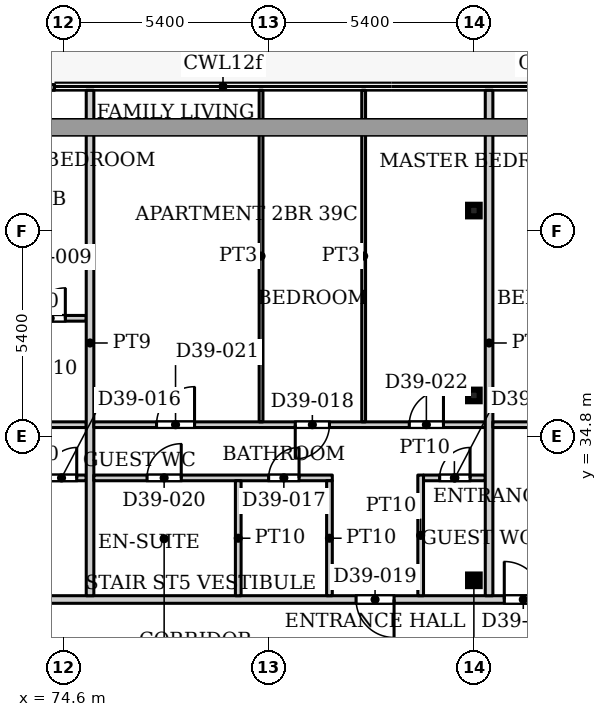
"""IFC4 building model, lengths in metres.
Left out: names, types, materials, properties, quantities, classifications, styles, units other than length and angle.
Written with IfcOpenShell. Run it as: python <this file> out.ifc"""

import sys

from ifc_helpers import new_model, si_unit, direction, frame, frame_2d, origin, origin_2d, place, context, subcontext, project, spatial, rectangle, hollow_rectangle, extrude, source, transform, mapped, element, fill, save


model = new_model("IFC4")
c1 = context("Model", 3, precision=1e-05, world=origin(), true_north=direction((0.0, 1.0)))
c2 = subcontext(c1, "Body", "Model", "MODEL_VIEW")
j1 = project(units=[si_unit("LENGTHUNIT", "METRE"), si_unit("PLANEANGLEUNIT", "RADIAN")], contexts=[c1])
p1 = place(None, origin())
s1 = spatial("IfcSite", under=j1, at=p1, CompositionType="ELEMENT")
p2 = place(p1, origin())
s2 = spatial("IfcBuilding", under=s1, at=p2, CompositionType="ELEMENT")
p3 = place(p2, frame((0.0, 0.0, 168.2)))
s3 = spatial("IfcBuildingStorey", under=s2, at=p3, CompositionType="ELEMENT", Elevation=168.2)
for number, where, z_axis, x_axis in (
    (1, (85.4, 31.005, 0.0), (0.0, 0.0, 1.0), (1.0, 0.0, 0.0)),
    (2, (85.4, 35.87, 0.0), (0.0, 0.0, 1.0), (1.0, 0.0, 0.0)),
    (3, (85.4, 40.735, 0.0), (0.0, 0.0, 1.0), (1.0, 0.0, 0.0)),
):
    element("IfcColumn", number, at=place(p3, frame(where, z_axis=z_axis, x_axis=x_axis)), inside=s3, PredefinedType="COLUMN", context=c2, shape_type="SweptSolid", body=[
        extrude(hollow_rectangle(XDim=0.305, YDim=0.305, WallThickness=0.016, InnerFilletRadius=0.016, OuterFilletRadius=0.032, at=origin_2d()), origin(), (0.0, 0.0, 1.0), 3.9),
    ])
p4 = place(p3, frame((71.965, 43.975, 0.0), z_axis=(0.0, 0.0, 1.0), x_axis=(1.0, 0.0, 0.0)))
e4 = element("IfcWall", 4, at=p4, inside=s3, PredefinedType="SOLIDWALL", context=c2, shape_type="SweptSolid", body=[
    extrude(rectangle(XDim=2.4, YDim=0.15, at=frame_2d((1.2, 0.0))), origin(), (0.0, 0.0, 1.0), 3.75),
])
p5 = place(p4, frame((0.3, 0.0, 0.0)))
e5 = element("IfcOpeningElement", 5, at=p5, cuts=e4, PredefinedType="OPENING", context=c2, shape_type="SweptSolid", body=[
    extrude(rectangle(XDim=1.8, YDim=2.4, at=frame_2d((0.9, 1.2))), frame((0.0, 0.085, 0.0), z_axis=(0.0, -1.0, 0.0), x_axis=(1.0, 0.0, 0.0)), (0.0, 0.0, 1.0), 0.17),
])
p6 = place(p3, frame((53.549, 30.5, 0.0), z_axis=(0.0, 0.0, 1.0), x_axis=(1.0, 0.0, 0.0)))
e6 = element("IfcWall", 6, at=p6, inside=s3, PredefinedType="PARTITIONING", context=c2, shape_type="SweptSolid", body=[
    extrude(rectangle(XDim=39.151, YDim=0.2, at=frame_2d((19.575, 0.0))), origin(), (0.0, 0.0, 1.0), 3.6),
])
p7 = place(p6, frame((2.801, 0.0, 0.0)))
e7 = element("IfcOpeningElement", 7, at=p7, cuts=e6, PredefinedType="OPENING", context=c2, shape_type="SweptSolid", body=[
    extrude(rectangle(XDim=1.0, YDim=2.1, at=frame_2d((0.5, 1.05))), frame((0.0, 0.11, 0.0), z_axis=(0.0, -1.0, 0.0), x_axis=(1.0, 0.0, 0.0)), (0.0, 0.0, 1.0), 0.22),
])
p8 = place(p6, frame((9.851, 0.0, 0.0)))
e8 = element("IfcOpeningElement", 8, at=p8, cuts=e6, PredefinedType="OPENING", context=c2, shape_type="SweptSolid", body=[
    extrude(rectangle(XDim=1.0, YDim=2.1, at=frame_2d((0.5, 1.05))), frame((0.0, 0.11, 0.0), z_axis=(0.0, -1.0, 0.0), x_axis=(1.0, 0.0, 0.0)), (0.0, 0.0, 1.0), 0.22),
])
p9 = place(p6, frame((28.751, 0.0, 0.0)))
e9 = element("IfcOpeningElement", 9, at=p9, cuts=e6, PredefinedType="OPENING", context=c2, shape_type="SweptSolid", body=[
    extrude(rectangle(XDim=1.0, YDim=2.1, at=frame_2d((0.5, 1.05))), frame((0.0, 0.11, 0.0), z_axis=(0.0, -1.0, 0.0), x_axis=(1.0, 0.0, 0.0)), (0.0, 0.0, 1.0), 0.22),
])
p10 = place(p6, frame((32.651, 0.0, 0.0)))
e10 = element("IfcOpeningElement", 10, at=p10, cuts=e6, PredefinedType="OPENING", context=c2, shape_type="SweptSolid", body=[
    extrude(rectangle(XDim=1.0, YDim=2.1, at=frame_2d((0.5, 1.05))), frame((0.0, 0.11, 0.0), z_axis=(0.0, -1.0, 0.0), x_axis=(1.0, 0.0, 0.0)), (0.0, 0.0, 1.0), 0.22),
])
p11 = place(p3, frame((63.1, 35.1, 0.0), z_axis=(0.0, 0.0, 1.0), x_axis=(1.0, 0.0, 0.0)))
e11 = element("IfcWall", 11, at=p11, inside=s3, PredefinedType="PARTITIONING", context=c2, shape_type="SweptSolid", body=[
    extrude(rectangle(XDim=12.1, YDim=0.15, at=frame_2d((6.05, 0.0))), origin(), (0.0, 0.0, 1.0), 3.6),
])
p12 = place(p11, frame((1.1, 0.0, 0.0)))
e12 = element("IfcOpeningElement", 12, at=p12, cuts=e11, PredefinedType="OPENING", context=c2, shape_type="SweptSolid", body=[
    extrude(rectangle(XDim=0.9, YDim=2.1, at=frame_2d((0.45, 1.05))), frame((0.0, 0.085, 0.0), z_axis=(0.0, -1.0, 0.0), x_axis=(1.0, 0.0, 0.0)), (0.0, 0.0, 1.0), 0.17),
])
p13 = place(p11, frame((5.1, 0.0, 0.0)))
e13 = element("IfcOpeningElement", 13, at=p13, cuts=e11, PredefinedType="OPENING", context=c2, shape_type="SweptSolid", body=[
    extrude(rectangle(XDim=1.0, YDim=2.1, at=frame_2d((0.5, 1.05))), frame((0.0, 0.085, 0.0), z_axis=(0.0, -1.0, 0.0), x_axis=(1.0, 0.0, 0.0)), (0.0, 0.0, 1.0), 0.17),
])
p14 = place(p11, frame((8.6, 0.0, 0.0)))
e14 = element("IfcOpeningElement", 14, at=p14, cuts=e11, PredefinedType="OPENING", context=c2, shape_type="SweptSolid", body=[
    extrude(rectangle(XDim=0.9, YDim=2.1, at=frame_2d((0.45, 1.05))), frame((0.0, 0.085, 0.0), z_axis=(0.0, -1.0, 0.0), x_axis=(1.0, 0.0, 0.0)), (0.0, 0.0, 1.0), 0.17),
])
p15 = place(p3, frame((64.725, 33.7, 0.0), z_axis=(0.0, 0.0, 1.0), x_axis=(1.0, 0.0, 0.0)))
e15 = element("IfcWall", 15, at=p15, inside=s3, PredefinedType="PARTITIONING", context=c2, shape_type="SweptSolid", body=[
    extrude(rectangle(XDim=10.475, YDim=0.15, at=frame_2d((5.237, 0.0))), origin(), (0.0, 0.0, 1.0), 3.6),
])
p16 = place(p15, frame((0.725, 0.0, 0.0)))
e16 = element("IfcOpeningElement", 16, at=p16, cuts=e15, PredefinedType="OPENING", context=c2, shape_type="SweptSolid", body=[
    extrude(rectangle(XDim=0.8, YDim=2.1, at=frame_2d((0.4, 1.05))), frame((0.0, 0.085, 0.0), z_axis=(0.0, -1.0, 0.0), x_axis=(1.0, 0.0, 0.0)), (0.0, 0.0, 1.0), 0.17),
])
p17 = place(p15, frame((7.125, 0.0, 0.0)))
e17 = element("IfcOpeningElement", 17, at=p17, cuts=e15, PredefinedType="OPENING", context=c2, shape_type="SweptSolid", body=[
    extrude(rectangle(XDim=0.9, YDim=2.1, at=frame_2d((0.45, 1.05))), frame((0.0, 0.085, 0.0), z_axis=(0.0, -1.0, 0.0), x_axis=(1.0, 0.0, 0.0)), (0.0, 0.0, 1.0), 0.17),
])
p18 = place(p15, frame((4.725, 0.0, 0.0)))
e18 = element("IfcOpeningElement", 18, at=p18, cuts=e15, PredefinedType="OPENING", context=c2, shape_type="SweptSolid", body=[
    extrude(rectangle(XDim=0.8, YDim=2.1, at=frame_2d((0.4, 1.05))), frame((0.0, 0.085, 0.0), z_axis=(0.0, -1.0, 0.0), x_axis=(1.0, 0.0, 0.0)), (0.0, 0.0, 1.0), 0.17),
])
p19 = place(p15, frame((2.675, 0.0, 0.0)))
e19 = element("IfcOpeningElement", 19, at=p19, cuts=e15, PredefinedType="OPENING", context=c2, shape_type="SweptSolid", body=[
    extrude(rectangle(XDim=0.8, YDim=2.1, at=frame_2d((0.4, 1.05))), frame((0.0, 0.085, 0.0), z_axis=(0.0, -1.0, 0.0), x_axis=(1.0, 0.0, 0.0)), (0.0, 0.0, 1.0), 0.17),
])
p20 = place(p15, frame((9.425, 0.0, 0.0)))
e20 = element("IfcOpeningElement", 20, at=p20, cuts=e15, PredefinedType="OPENING", context=c2, shape_type="SweptSolid", body=[
    extrude(rectangle(XDim=0.8, YDim=2.1, at=frame_2d((0.4, 1.05))), frame((0.0, 0.085, 0.0), z_axis=(0.0, -1.0, 0.0), x_axis=(1.0, 0.0, 0.0)), (0.0, 0.0, 1.0), 0.17),
])
p21 = place(p3, frame((73.275, 37.9, 0.0), z_axis=(0.0, 0.0, 1.0), x_axis=(1.0, 0.0, 0.0)))
e21 = element("IfcWall", 21, at=p21, inside=s3, PredefinedType="PARTITIONING", context=c2, shape_type="SweptSolid", body=[
    extrude(rectangle(XDim=1.925, YDim=0.15, at=frame_2d((0.962, 0.0))), origin(), (0.0, 0.0, 1.0), 3.6),
])
p22 = place(p21, frame((0.575, 0.0, 0.0)))
e22 = element("IfcOpeningElement", 22, at=p22, cuts=e21, PredefinedType="OPENING", context=c2, shape_type="SweptSolid", body=[
    extrude(rectangle(XDim=0.8, YDim=2.1, at=frame_2d((0.4, 1.05))), frame((0.0, 0.085, 0.0), z_axis=(0.0, -1.0, 0.0), x_axis=(1.0, 0.0, 0.0)), (0.0, 0.0, 1.0), 0.17),
])
p23 = place(p3, frame((75.3, 30.6, 0.0), z_axis=(0.0, 0.0, 1.0), x_axis=(0.0, 1.0, 0.0)))
e23 = element("IfcWall", 23, at=p23, inside=s3, PredefinedType="PARTITIONING", context=c2, shape_type="SweptSolid", body=[
    extrude(rectangle(XDim=13.3, YDim=0.2, at=frame_2d((6.65, 0.0))), origin(), (0.0, 0.0, 1.0), 3.6),
])
p24 = place(p3, frame((75.4, 33.7, 0.0), z_axis=(0.0, 0.0, 1.0), x_axis=(1.0, 0.0, 0.0)))
e24 = element("IfcWall", 24, at=p24, inside=s3, PredefinedType="PARTITIONING", context=c2, shape_type="SweptSolid", body=[
    extrude(rectangle(XDim=6.275, YDim=0.15, at=frame_2d((3.138, 0.0))), origin(), (0.0, 0.0, 1.0), 3.6),
])
p25 = place(p24, frame((4.6, 0.0, 0.0)))
e25 = element("IfcOpeningElement", 25, at=p25, cuts=e24, PredefinedType="OPENING", context=c2, shape_type="SweptSolid", body=[
    extrude(rectangle(XDim=0.8, YDim=2.1, at=frame_2d((0.4, 1.05))), frame((0.0, 0.085, 0.0), z_axis=(0.0, -1.0, 0.0), x_axis=(1.0, 0.0, 0.0)), (0.0, 0.0, 1.0), 0.17),
])
p26 = place(p24, frame((1.4, 0.0, 0.0)))
e26 = element("IfcOpeningElement", 26, at=p26, cuts=e24, PredefinedType="OPENING", context=c2, shape_type="SweptSolid", body=[
    extrude(rectangle(XDim=0.9, YDim=2.1, at=frame_2d((0.45, 1.05))), frame((0.0, 0.085, 0.0), z_axis=(0.0, -1.0, 0.0), x_axis=(1.0, 0.0, 0.0)), (0.0, 0.0, 1.0), 0.17),
])
p27 = place(p3, frame((75.4, 35.1, 0.0), z_axis=(0.0, 0.0, 1.0), x_axis=(1.0, 0.0, 0.0)))
e27 = element("IfcWall", 27, at=p27, inside=s3, PredefinedType="PARTITIONING", context=c2, shape_type="SweptSolid", body=[
    extrude(rectangle(XDim=10.3, YDim=0.15, at=frame_2d((5.15, 0.0))), origin(), (0.0, 0.0, 1.0), 3.6),
])
p28 = place(p27, frame((5.3, 0.0, 0.0)))
e28 = element("IfcOpeningElement", 28, at=p28, cuts=e27, PredefinedType="OPENING", context=c2, shape_type="SweptSolid", body=[
    extrude(rectangle(XDim=0.9, YDim=2.1, at=frame_2d((0.45, 1.05))), frame((0.0, 0.085, 0.0), z_axis=(0.0, -1.0, 0.0), x_axis=(1.0, 0.0, 0.0)), (0.0, 0.0, 1.0), 0.17),
])
p29 = place(p27, frame((1.65, 0.0, 0.0)))
e29 = element("IfcOpeningElement", 29, at=p29, cuts=e27, PredefinedType="OPENING", context=c2, shape_type="SweptSolid", body=[
    extrude(rectangle(XDim=1.0, YDim=2.1, at=frame_2d((0.5, 1.05))), frame((0.0, 0.085, 0.0), z_axis=(0.0, -1.0, 0.0), x_axis=(1.0, 0.0, 0.0)), (0.0, 0.0, 1.0), 0.17),
])
p30 = place(p27, frame((8.3, 0.0, 0.0)))
e30 = element("IfcOpeningElement", 30, at=p30, cuts=e27, PredefinedType="OPENING", context=c2, shape_type="SweptSolid", body=[
    extrude(rectangle(XDim=0.9, YDim=2.1, at=frame_2d((0.45, 1.05))), frame((0.0, 0.085, 0.0), z_axis=(0.0, -1.0, 0.0), x_axis=(1.0, 0.0, 0.0)), (0.0, 0.0, 1.0), 0.17),
])
p31 = place(p3, frame((79.2, 30.6, 0.0), z_axis=(0.0, 0.0, 1.0), x_axis=(0.0, 1.0, 0.0)))
e31 = element("IfcWall", 31, at=p31, inside=s3, PredefinedType="PARTITIONING", context=c2, shape_type="SweptSolid", body=[
    extrude(rectangle(XDim=3.025, YDim=0.15, at=frame_2d((1.512, 0.0))), origin(), (0.0, 0.0, 1.0), 3.6),
])
p32 = place(p3, frame((79.8, 35.175, 0.0), z_axis=(0.0, 0.0, 1.0), x_axis=(0.0, 1.0, 0.0)))
e32 = element("IfcWall", 32, at=p32, inside=s3, PredefinedType="PARTITIONING", context=c2, shape_type="SweptSolid", body=[
    extrude(rectangle(XDim=8.725, YDim=0.1, at=frame_2d((4.362, 0.0))), origin(), (0.0, 0.0, 1.0), 3.6),
])
p33 = place(p3, frame((81.6, 30.6, 0.0), z_axis=(0.0, 0.0, 1.0), x_axis=(0.0, 1.0, 0.0)))
e33 = element("IfcWall", 33, at=p33, inside=s3, PredefinedType="PARTITIONING", context=c2, shape_type="SweptSolid", body=[
    extrude(rectangle(XDim=3.025, YDim=0.15, at=frame_2d((1.512, 0.0))), origin(), (0.0, 0.0, 1.0), 3.6),
])
p34 = place(p3, frame((82.5, 35.175, 0.0), z_axis=(0.0, 0.0, 1.0), x_axis=(0.0, 1.0, 0.0)))
e34 = element("IfcWall", 34, at=p34, inside=s3, PredefinedType="PARTITIONING", context=c2, shape_type="SweptSolid", body=[
    extrude(rectangle(XDim=8.725, YDim=0.1, at=frame_2d((4.362, 0.0))), origin(), (0.0, 0.0, 1.0), 3.6),
])
p35 = place(p3, frame((84.0, 30.6, 0.0), z_axis=(0.0, 0.0, 1.0), x_axis=(0.0, 1.0, 0.0)))
e35 = element("IfcWall", 35, at=p35, inside=s3, PredefinedType="PARTITIONING", context=c2, shape_type="SweptSolid", body=[
    extrude(rectangle(XDim=3.175, YDim=0.15, at=frame_2d((1.587, 0.0))), origin(), (0.0, 0.0, 1.0), 3.6),
])
p36 = place(p3, frame((84.075, 33.7, 0.0), z_axis=(0.0, 0.0, 1.0), x_axis=(1.0, 0.0, 0.0)))
e36 = element("IfcWall", 36, at=p36, inside=s3, PredefinedType="PARTITIONING", context=c2, shape_type="SweptSolid", body=[
    extrude(rectangle(XDim=1.625, YDim=0.15, at=frame_2d((0.812, 0.0))), origin(), (0.0, 0.0, 1.0), 3.6),
])
p37 = place(p36, frame((0.425, 0.0, 0.0)))
e37 = element("IfcOpeningElement", 37, at=p37, cuts=e36, PredefinedType="OPENING", context=c2, shape_type="SweptSolid", body=[
    extrude(rectangle(XDim=0.8, YDim=2.1, at=frame_2d((0.4, 1.05))), frame((0.0, 0.085, 0.0), z_axis=(0.0, -1.0, 0.0), x_axis=(1.0, 0.0, 0.0)), (0.0, 0.0, 1.0), 0.17),
])
p38 = place(p3, frame((85.8, 30.6, 0.0), z_axis=(0.0, 0.0, 1.0), x_axis=(0.0, 1.0, 0.0)))
e38 = element("IfcWall", 38, at=p38, inside=s3, PredefinedType="PARTITIONING", context=c2, shape_type="SweptSolid", body=[
    extrude(rectangle(XDim=13.3, YDim=0.2, at=frame_2d((6.65, 0.0))), origin(), (0.0, 0.0, 1.0), 3.6),
])
p39 = place(p3, frame((85.9, 35.1, 0.0), z_axis=(0.0, 0.0, 1.0), x_axis=(1.0, 0.0, 0.0)))
e39 = element("IfcWall", 39, at=p39, inside=s3, PredefinedType="PARTITIONING", context=c2, shape_type="SweptSolid", body=[
    extrude(rectangle(XDim=8.6, YDim=0.15, at=frame_2d((4.3, 0.0))), origin(), (0.0, 0.0, 1.0), 3.6),
])
p40 = place(p39, frame((1.1, 0.0, 0.0)))
e40 = element("IfcOpeningElement", 40, at=p40, cuts=e39, PredefinedType="OPENING", context=c2, shape_type="SweptSolid", body=[
    extrude(rectangle(XDim=0.9, YDim=2.1, at=frame_2d((0.45, 1.05))), frame((0.0, 0.085, 0.0), z_axis=(0.0, -1.0, 0.0), x_axis=(1.0, 0.0, 0.0)), (0.0, 0.0, 1.0), 0.17),
])
p41 = place(p39, frame((5.4, 0.0, 0.0)))
e41 = element("IfcOpeningElement", 41, at=p41, cuts=e39, PredefinedType="OPENING", context=c2, shape_type="SweptSolid", body=[
    extrude(rectangle(XDim=1.0, YDim=2.1, at=frame_2d((0.5, 1.05))), frame((0.0, 0.085, 0.0), z_axis=(0.0, -1.0, 0.0), x_axis=(1.0, 0.0, 0.0)), (0.0, 0.0, 1.0), 0.17),
])
m1 = source(origin(), c2, "Body", "SweptSolid", [
    extrude(rectangle(XDim=0.8, YDim=2.1, at=frame_2d((0.4, 1.05))), frame((0.0, 0.025, 0.0), z_axis=(0.0, -1.0, 0.0), x_axis=(1.0, 0.0, 0.0)), (0.0, 0.0, 1.0), 0.05),
])
p42 = place(p22, origin())
e42 = element("IfcDoor", 42, at=p42, inside=s3, OperationType="SINGLE_SWING_LEFT", PredefinedType="DOOR", context=c2, shape_type="MappedRepresentation", body=[
    mapped(m1, transform((0.0, 0.0, 0.0), x_axis=(1.0, 0.0, 0.0), y_axis=(0.0, 1.0, 0.0), z_axis=(0.0, 0.0, 1.0), scale=1.0)),
])
fill(e22, e42)
p43 = place(p20, origin())
e43 = element("IfcDoor", 43, at=p43, inside=s3, OperationType="SINGLE_SWING_LEFT", PredefinedType="DOOR", context=c2, shape_type="MappedRepresentation", body=[
    mapped(m1, transform((0.0, 0.0, 0.0), x_axis=(1.0, 0.0, 0.0), y_axis=(0.0, 1.0, 0.0), z_axis=(0.0, 0.0, 1.0), scale=1.0)),
])
fill(e20, e43)
p44 = place(p25, origin())
e44 = element("IfcDoor", 44, at=p44, inside=s3, OperationType="SINGLE_SWING_LEFT", PredefinedType="DOOR", context=c2, shape_type="MappedRepresentation", body=[
    mapped(m1, transform((0.0, 0.0, 0.0), x_axis=(1.0, 0.0, 0.0), y_axis=(0.0, 1.0, 0.0), z_axis=(0.0, 0.0, 1.0), scale=1.0)),
])
fill(e25, e44)
m2 = source(origin(), c2, "Body", "SweptSolid", [
    extrude(rectangle(XDim=0.9, YDim=2.1, at=frame_2d((0.45, 1.05))), frame((0.0, 0.025, 0.0), z_axis=(0.0, -1.0, 0.0), x_axis=(1.0, 0.0, 0.0)), (0.0, 0.0, 1.0), 0.05),
])
p45 = place(p28, origin())
e45 = element("IfcDoor", 45, at=p45, inside=s3, OperationType="SINGLE_SWING_RIGHT", PredefinedType="DOOR", context=c2, shape_type="MappedRepresentation", body=[
    mapped(m2, transform((0.0, 0.0, 0.0), x_axis=(1.0, 0.0, 0.0), y_axis=(0.0, 1.0, 0.0), z_axis=(0.0, 0.0, 1.0), scale=1.0)),
])
fill(e28, e45)
m3 = source(origin(), c2, "Body", "SweptSolid", [
    extrude(rectangle(XDim=1.0, YDim=2.1, at=frame_2d((0.5, 1.05))), frame((0.0, 0.025, 0.0), z_axis=(0.0, -1.0, 0.0), x_axis=(1.0, 0.0, 0.0)), (0.0, 0.0, 1.0), 0.05),
])
p46 = place(p9, origin())
e46 = element("IfcDoor", 46, at=p46, inside=s3, OperationType="SINGLE_SWING_RIGHT", PredefinedType="DOOR", context=c2, shape_type="MappedRepresentation", body=[
    mapped(m3, transform((0.0, 0.0, 0.0), x_axis=(1.0, 0.0, 0.0), y_axis=(0.0, 1.0, 0.0), z_axis=(0.0, 0.0, 1.0), scale=1.0)),
])
fill(e9, e46)
p47 = place(p26, origin())
e47 = element("IfcDoor", 47, at=p47, inside=s3, OperationType="SINGLE_SWING_LEFT", PredefinedType="DOOR", context=c2, shape_type="MappedRepresentation", body=[
    mapped(m2, transform((0.0, 0.0, 0.0), x_axis=(1.0, 0.0, 0.0), y_axis=(0.0, 1.0, 0.0), z_axis=(0.0, 0.0, 1.0), scale=1.0)),
])
fill(e26, e47)
m4 = source(origin(), c2, "Body", "SweptSolid", [
    extrude(rectangle(XDim=1.0, YDim=2.1, at=frame_2d((0.5, 1.05))), frame((0.0, 0.025, 0.0), z_axis=(0.0, -1.0, 0.0), x_axis=(1.0, 0.0, 0.0)), (0.0, 0.0, 1.0), 0.05),
])
p48 = place(p29, origin())
e48 = element("IfcDoor", 48, at=p48, inside=s3, OperationType="SINGLE_SWING_LEFT", PredefinedType="DOOR", context=c2, shape_type="MappedRepresentation", body=[
    mapped(m4, transform((0.0, 0.0, 0.0), x_axis=(1.0, 0.0, 0.0), y_axis=(0.0, 1.0, 0.0), z_axis=(0.0, 0.0, 1.0), scale=1.0)),
])
fill(e29, e48)
p49 = place(p30, origin())
e49 = element("IfcDoor", 49, at=p49, inside=s3, OperationType="SINGLE_SWING_LEFT", PredefinedType="DOOR", context=c2, shape_type="MappedRepresentation", body=[
    mapped(m2, transform((0.0, 0.0, 0.0), x_axis=(1.0, 0.0, 0.0), y_axis=(0.0, 1.0, 0.0), z_axis=(0.0, 0.0, 1.0), scale=1.0)),
])
fill(e30, e49)
p50 = place(p37, origin())
e50 = element("IfcDoor", 50, at=p50, inside=s3, OperationType="SINGLE_SWING_LEFT", PredefinedType="DOOR", context=c2, shape_type="MappedRepresentation", body=[
    mapped(m1, transform((0.0, 0.0, 0.0), x_axis=(1.0, 0.0, 0.0), y_axis=(0.0, 1.0, 0.0), z_axis=(0.0, 0.0, 1.0), scale=1.0)),
])
fill(e37, e50)
p51 = place(p10, origin())
e51 = element("IfcDoor", 51, at=p51, inside=s3, OperationType="SINGLE_SWING_LEFT", PredefinedType="DOOR", context=c2, shape_type="MappedRepresentation", body=[
    mapped(m3, transform((0.0, 0.0, 0.0), x_axis=(1.0, 0.0, 0.0), y_axis=(0.0, 1.0, 0.0), z_axis=(0.0, 0.0, 1.0), scale=1.0)),
])
fill(e10, e51)
save(model, sys.argv[1])
